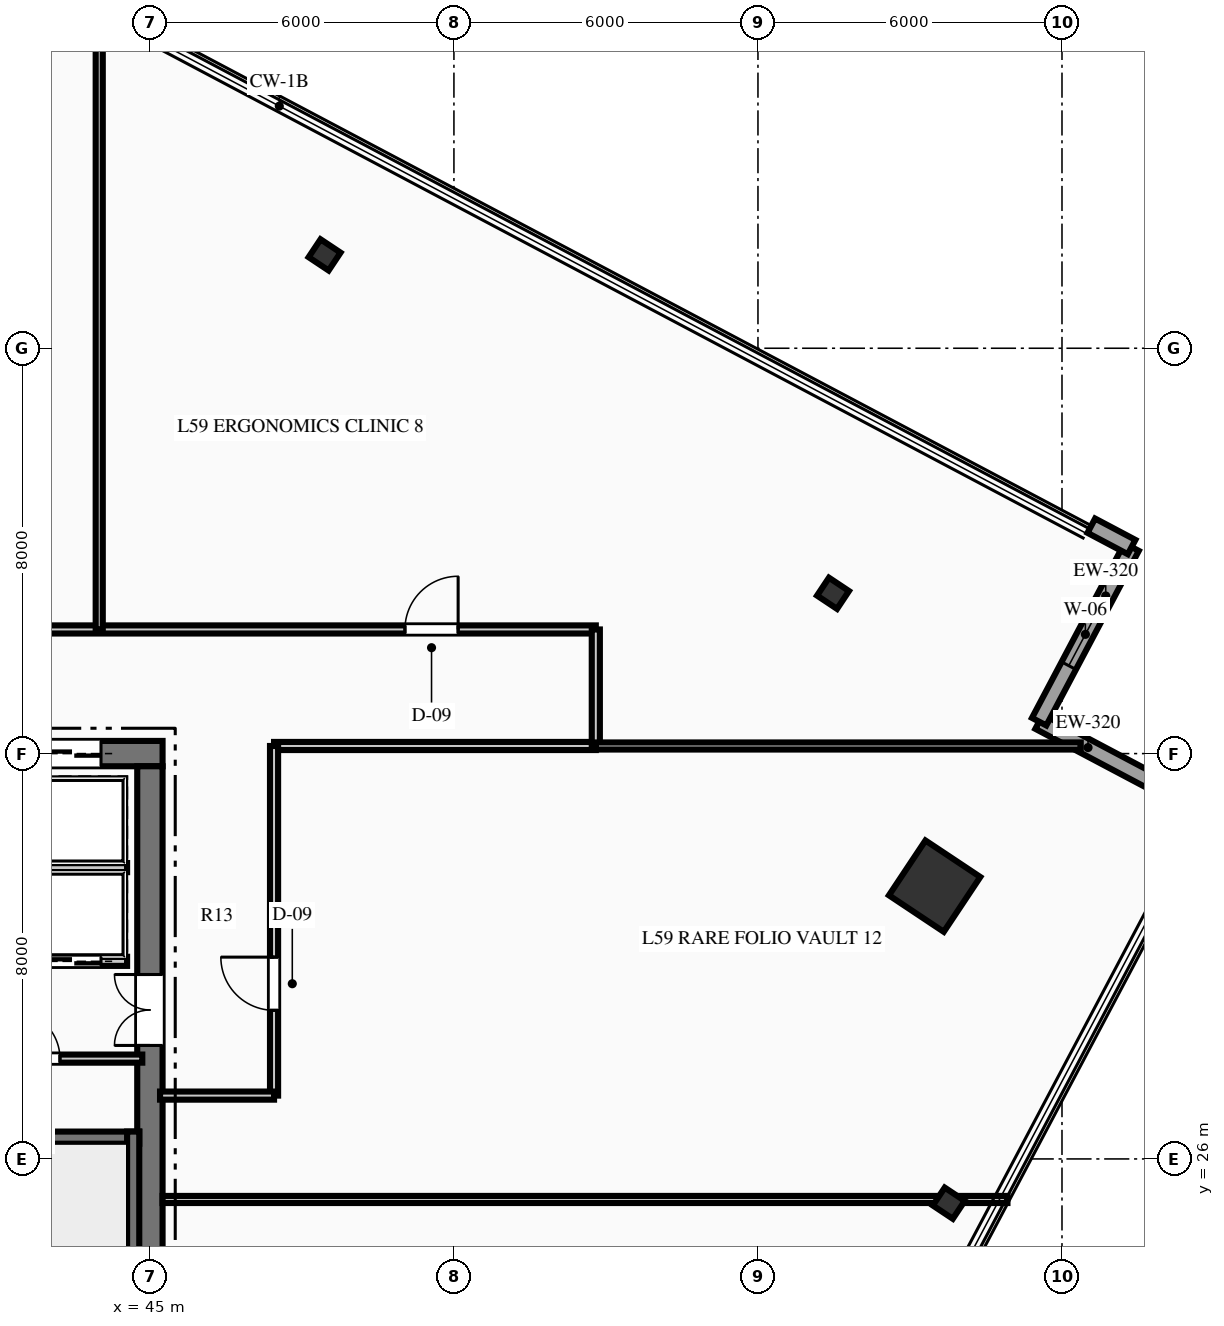
"""IFC4 building model, lengths in metres.
Left out: names, types, materials, properties, quantities, classifications, styles, units other than length and angle.
Written with IfcOpenShell. Run it as: python <this file> out.ifc"""

import sys

from ifc_helpers import new_model, si_unit, direction, frame, frame_2d, origin, origin_2d, place, context, subcontext, project, spatial, rectangle, hollow_rectangle, i_section, extrude, element, fill, save


model = new_model("IFC4")
c1 = context("Model", 3, precision=1e-05, world=origin(), true_north=direction((0.0, 1.0)))
c2 = subcontext(c1, "Body", "Model", "MODEL_VIEW")
j1 = project(units=[si_unit("LENGTHUNIT", "METRE"), si_unit("PLANEANGLEUNIT", "RADIAN")], contexts=[c1])
p1 = place(None, origin())
s1 = spatial("IfcSite", under=j1, at=p1, CompositionType="ELEMENT")
p2 = place(p1, origin())
s2 = spatial("IfcBuilding", under=s1, at=p2, CompositionType="ELEMENT")
p3 = place(p2, frame((0.0, 0.0, 235.95)))
s3 = spatial("IfcBuildingStorey", under=s2, at=p3, CompositionType="ELEMENT", Elevation=235.95)
p4 = place(p3, frame((26.75, 34.0, 0.0), z_axis=(0.0, 0.0, 1.0), x_axis=(1.0, 0.0, 0.0)))
e1 = element("IfcWall", 1, at=p4, inside=s3, PredefinedType="SHEAR", context=c2, shape_type="SweptSolid", body=[
    extrude(rectangle(XDim=18.5, YDim=0.5, at=frame_2d((9.25, 0.0))), origin(), (0.0, 0.0, 1.0), 3.75),
])
p5 = place(p4, frame((13.935, 0.0, 0.0)))
e2 = element("IfcOpeningElement", 2, at=p5, cuts=e1, PredefinedType="OPENING", context=c2, shape_type="SweptSolid", body=[
    extrude(rectangle(XDim=1.1, YDim=2.15, at=frame_2d((0.55, 1.075))), frame((0.0, 0.26, 0.0), z_axis=(0.0, -1.0, 0.0), x_axis=(1.0, 0.0, 0.0)), (0.0, 0.0, 1.0), 0.52),
])
p6 = place(p4, frame((16.185, 0.0, 0.0)))
e3 = element("IfcOpeningElement", 3, at=p6, cuts=e1, PredefinedType="OPENING", context=c2, shape_type="SweptSolid", body=[
    extrude(rectangle(XDim=1.1, YDim=2.15, at=frame_2d((0.55, 1.075))), frame((0.0, 0.26, 0.0), z_axis=(0.0, -1.0, 0.0), x_axis=(1.0, 0.0, 0.0)), (0.0, 0.0, 1.0), 0.52),
])
p7 = place(p3, frame((45.0, 18.25, 0.0), z_axis=(0.0, 0.0, 1.0), x_axis=(0.0, 1.0, 0.0)))
e4 = element("IfcWall", 4, at=p7, inside=s3, PredefinedType="SHEAR", context=c2, shape_type="SweptSolid", body=[
    extrude(rectangle(XDim=15.5, YDim=0.5, at=frame_2d((7.75, 0.0))), origin(), (0.0, 0.0, 1.0), 3.75),
])
p8 = place(p7, frame((9.99, 0.0, 0.0)))
e5 = element("IfcOpeningElement", 5, at=p8, cuts=e4, PredefinedType="OPENING", context=c2, shape_type="SweptSolid", body=[
    extrude(rectangle(XDim=1.4, YDim=2.2, at=frame_2d((0.7, 1.1))), frame((0.0, 0.26, 0.0), z_axis=(0.0, -1.0, 0.0), x_axis=(1.0, 0.0, 0.0)), (0.0, 0.0, 1.0), 0.52),
])
p9 = place(p3, frame((40.81, 26.42, 0.0), z_axis=(0.0, 0.0, 1.0), x_axis=(1.0, 0.0, 0.0)))
e6 = element("IfcWall", 6, at=p9, inside=s3, PredefinedType="SHEAR", context=c2, shape_type="SweptSolid", body=[
    extrude(rectangle(XDim=3.98, YDim=0.24, at=frame_2d((1.99, 0.0))), origin(), (0.0, 0.0, 1.0), 3.75),
])
p10 = place(p3, frame((44.67, 18.28, 0.0), z_axis=(0.0, 0.0, 1.0), x_axis=(0.0, 1.0, 0.0)))
e7 = element("IfcWall", 7, at=p10, inside=s3, PredefinedType="SHEAR", context=c2, shape_type="SweptSolid", body=[
    extrude(rectangle(XDim=8.26, YDim=0.24, at=frame_2d((4.13, 0.0))), origin(), (0.0, 0.0, 1.0), 3.75),
])
p11 = place(p3, frame((60.486, 31.384, 0.0), z_axis=(0.0, 0.0, 1.0), x_axis=(0.554118199338, 0.832437998389, 0.0)))
e8 = element("IfcColumn", 8, at=p11, inside=s3, PredefinedType="COLUMN", context=c2, shape_type="SweptSolid", body=[
    extrude(hollow_rectangle(XDim=1.3, YDim=1.3, WallThickness=0.06, at=origin_2d()), origin(), (0.0, 0.0, 1.0), 3.75),
])
for number, where, z_axis, x_axis in (
    (9, (60.766, 25.126, 0.0), (0.0, 0.0, 1.0), (0.554, 0.832, 0.0)),
    (10, (58.481, 37.164, 0.0), (0.0, 0.0, 1.0), (0.554, 0.832, 0.0)),
    (11, (48.448, 43.842, 0.0), (0.0, 0.0, 1.0), (0.554, 0.832, 0.0)),
):
    element("IfcColumn", number, at=place(p3, frame(where, z_axis=z_axis, x_axis=x_axis)), inside=s3, PredefinedType="COLUMN", context=c2, shape_type="SweptSolid", body=[
        extrude(i_section(OverallWidth=0.424, OverallDepth=0.474, WebThickness=0.048, FlangeThickness=0.077, at=origin_2d()), origin(), (0.0, 0.0, 1.0), 3.75),
    ])
p12 = place(p3, frame((62.549, 34.63, 0.0), z_axis=(0.0, 0.0, 1.0), x_axis=(0.883768120839, -0.467925110021, 0.0)))
e12 = element("IfcWall", 12, at=p12, inside=s3, PredefinedType="STANDARD", context=c2, shape_type="SweptSolid", body=[
    extrude(rectangle(XDim=3.9, YDim=0.32, at=frame_2d((1.95, 0.0))), origin(), (0.0, 0.0, 1.0), 3.4),
])
p13 = place(p3, frame((64.374, 38.077, 0.0), z_axis=(0.0, 0.0, 1.0), x_axis=(-0.467925110021, -0.883768120839, 0.0)))
e13 = element("IfcWall", 13, at=p13, inside=s3, PredefinedType="STANDARD", context=c2, shape_type="SweptSolid", body=[
    extrude(rectangle(XDim=3.9, YDim=0.32, at=frame_2d((1.95, 0.0))), origin(), (0.0, 0.0, 1.0), 3.4),
])
p14 = place(p13, frame((1.25, 0.0, 0.85)))
e14 = element("IfcOpeningElement", 14, at=p14, cuts=e13, PredefinedType="OPENING", context=c2, shape_type="SweptSolid", body=[
    extrude(rectangle(XDim=1.4, YDim=2.0, at=frame_2d((0.7, 1.0))), frame((0.0, 0.17, 0.0), z_axis=(0.0, -1.0, 0.0), x_axis=(1.0, 0.0, 0.0)), (0.0, 0.0, 1.0), 0.34),
])
p15 = place(p3, frame((63.579, 38.498, 0.0), z_axis=(0.0, 0.0, 1.0), x_axis=(0.883768120839, -0.467925110021, 0.0)))
e15 = element("IfcWall", 15, at=p15, inside=s3, PredefinedType="STANDARD", context=c2, shape_type="SweptSolid", body=[
    extrude(rectangle(XDim=0.9, YDim=0.32, at=frame_2d((0.45, 0.0))), origin(), (0.0, 0.0, 1.0), 3.4),
])
p16 = place(p3, frame((40.8, 27.98, 0.0), z_axis=(0.0, 0.0, 1.0), x_axis=(1.0, 0.0, 0.0)))
e16 = element("IfcWall", 16, at=p16, inside=s3, PredefinedType="PARTITIONING", context=c2, shape_type="SweptSolid", body=[
    extrude(rectangle(XDim=4.05, YDim=0.16, at=frame_2d((2.025, 0.0))), origin(), (0.0, 0.0, 1.0), 3.4),
])
p17 = place(p16, frame((1.475, 0.0, 0.0)))
e17 = element("IfcOpeningElement", 17, at=p17, cuts=e16, PredefinedType="OPENING", context=c2, shape_type="SweptSolid", body=[
    extrude(rectangle(XDim=0.95, YDim=2.15, at=frame_2d((0.475, 1.075))), frame((0.0, 0.09, 0.0), z_axis=(0.0, -1.0, 0.0), x_axis=(1.0, 0.0, 0.0)), (0.0, 0.0, 1.0), 0.18),
])
p18 = place(p3, frame((40.12, 29.9, 0.0), z_axis=(0.0, 0.0, 1.0), x_axis=(1.0, 0.0, 0.0)))
e18 = element("IfcWall", 18, at=p18, inside=s3, PredefinedType="PARTITIONING", context=c2, shape_type="SweptSolid", body=[
    extrude(rectangle(XDim=4.43, YDim=0.18, at=frame_2d((2.215, 0.0))), origin(), (0.0, 0.0, 1.0), 3.4),
])
p19 = place(p18, frame((0.565, 0.0, 0.0)))
e19 = element("IfcOpeningElement", 19, at=p19, cuts=e18, PredefinedType="OPENING", context=c2, shape_type="SweptSolid", body=[
    extrude(rectangle(XDim=1.1, YDim=2.15, at=frame_2d((0.55, 1.075))), frame((0.0, 0.1, 0.0), z_axis=(0.0, -1.0, 0.0), x_axis=(1.0, 0.0, 0.0)), (0.0, 0.0, 1.0), 0.2),
])
p20 = place(p18, frame((2.815, 0.0, 0.0)))
e20 = element("IfcOpeningElement", 20, at=p20, cuts=e18, PredefinedType="OPENING", context=c2, shape_type="SweptSolid", body=[
    extrude(rectangle(XDim=1.1, YDim=2.15, at=frame_2d((0.55, 1.075))), frame((0.0, 0.1, 0.0), z_axis=(0.0, -1.0, 0.0), x_axis=(1.0, 0.0, 0.0)), (0.0, 0.0, 1.0), 0.2),
])
p21 = place(p3, frame((40.12, 31.75, 0.0), z_axis=(0.0, 0.0, 1.0), x_axis=(1.0, 0.0, 0.0)))
e21 = element("IfcWall", 21, at=p21, inside=s3, PredefinedType="PARTITIONING", context=c2, shape_type="SweptSolid", body=[
    extrude(rectangle(XDim=4.43, YDim=0.18, at=frame_2d((2.215, 0.0))), origin(), (0.0, 0.0, 1.0), 3.4),
])
p22 = place(p3, frame((18.2, 36.45, 0.0), z_axis=(0.0, 0.0, 1.0), x_axis=(1.0, 0.0, 0.0)))
e22 = element("IfcWall", 22, at=p22, inside=s3, PredefinedType="PARTITIONING", context=c2, shape_type="SweptSolid", body=[
    extrude(rectangle(XDim=35.6, YDim=0.16, at=frame_2d((17.8, 0.0))), origin(), (0.0, 0.0, 1.0), 2.779),
])
p23 = place(p22, frame((7.55, 0.0, 0.0)))
e23 = element("IfcOpeningElement", 23, at=p23, cuts=e22, PredefinedType="OPENING", context=c2, shape_type="SweptSolid", body=[
    extrude(rectangle(XDim=0.9, YDim=2.15, at=frame_2d((0.45, 1.075))), frame((0.0, 0.09, 0.0), z_axis=(0.0, -1.0, 0.0), x_axis=(1.0, 0.0, 0.0)), (0.0, 0.0, 1.0), 0.18),
])
p24 = place(p22, frame((9.85, 0.0, 0.0)))
e24 = element("IfcOpeningElement", 24, at=p24, cuts=e22, PredefinedType="OPENING", context=c2, shape_type="SweptSolid", body=[
    extrude(rectangle(XDim=0.9, YDim=2.15, at=frame_2d((0.45, 1.075))), frame((0.0, 0.09, 0.0), z_axis=(0.0, -1.0, 0.0), x_axis=(1.0, 0.0, 0.0)), (0.0, 0.0, 1.0), 0.18),
])
p25 = place(p22, frame((12.1, 0.0, 0.0)))
e25 = element("IfcOpeningElement", 25, at=p25, cuts=e22, PredefinedType="OPENING", context=c2, shape_type="SweptSolid", body=[
    extrude(rectangle(XDim=1.0, YDim=2.15, at=frame_2d((0.5, 1.075))), frame((0.0, 0.09, 0.0), z_axis=(0.0, -1.0, 0.0), x_axis=(1.0, 0.0, 0.0)), (0.0, 0.0, 1.0), 0.18),
])
p26 = place(p22, frame((4.345, 0.0, 0.0)))
e26 = element("IfcOpeningElement", 26, at=p26, cuts=e22, PredefinedType="OPENING", context=c2, shape_type="SweptSolid", body=[
    extrude(rectangle(XDim=1.05, YDim=2.15, at=frame_2d((0.525, 1.075))), frame((0.0, 0.09, 0.0), z_axis=(0.0, -1.0, 0.0), x_axis=(1.0, 0.0, 0.0)), (0.0, 0.0, 1.0), 0.18),
])
p27 = place(p22, frame((19.035, 0.0, 0.0)))
e27 = element("IfcOpeningElement", 27, at=p27, cuts=e22, PredefinedType="OPENING", context=c2, shape_type="SweptSolid", body=[
    extrude(rectangle(XDim=1.05, YDim=2.15, at=frame_2d((0.525, 1.075))), frame((0.0, 0.09, 0.0), z_axis=(0.0, -1.0, 0.0), x_axis=(1.0, 0.0, 0.0)), (0.0, 0.0, 1.0), 0.18),
])
p28 = place(p22, frame((31.833, 0.0, 0.0)))
e28 = element("IfcOpeningElement", 28, at=p28, cuts=e22, PredefinedType="OPENING", context=c2, shape_type="SweptSolid", body=[
    extrude(rectangle(XDim=1.05, YDim=2.15, at=frame_2d((0.525, 1.075))), frame((0.0, 0.09, 0.0), z_axis=(0.0, -1.0, 0.0), x_axis=(1.0, 0.0, 0.0)), (0.0, 0.0, 1.0), 0.18),
])
p29 = place(p3, frame((47.45, 34.15, 0.0), z_axis=(0.0, 0.0, 1.0), x_axis=(1.0, 0.0, 0.0)))
e29 = element("IfcWall", 29, at=p29, inside=s3, PredefinedType="PARTITIONING", context=c2, shape_type="SweptSolid", body=[
    extrude(rectangle(XDim=6.35, YDim=0.16, at=frame_2d((3.175, 0.0))), origin(), (0.0, 0.0, 1.0), 3.4),
])
p30 = place(p3, frame((47.45, 27.25, 0.0), z_axis=(0.0, 0.0, 1.0), x_axis=(0.0, 1.0, 0.0)))
e30 = element("IfcWall", 30, at=p30, inside=s3, PredefinedType="PARTITIONING", context=c2, shape_type="SweptSolid", body=[
    extrude(rectangle(XDim=6.9, YDim=0.16, at=frame_2d((3.45, 0.0))), origin(), (0.0, 0.0, 1.0), 3.4),
])
p31 = place(p30, frame((1.683, 0.0, 0.0)))
e31 = element("IfcOpeningElement", 31, at=p31, cuts=e30, PredefinedType="OPENING", context=c2, shape_type="SweptSolid", body=[
    extrude(rectangle(XDim=1.05, YDim=2.15, at=frame_2d((0.525, 1.075))), frame((0.0, 0.09, 0.0), z_axis=(0.0, -1.0, 0.0), x_axis=(1.0, 0.0, 0.0)), (0.0, 0.0, 1.0), 0.18),
])
p32 = place(p3, frame((45.2, 27.25, 0.0), z_axis=(0.0, 0.0, 1.0), x_axis=(1.0, 0.0, 0.0)))
e32 = element("IfcWall", 32, at=p32, inside=s3, PredefinedType="PARTITIONING", context=c2, shape_type="SweptSolid", body=[
    extrude(rectangle(XDim=2.25, YDim=0.16, at=frame_2d((1.125, 0.0))), origin(), (0.0, 0.0, 1.0), 3.4),
])
p33 = place(p3, frame((53.8, 34.15, 0.0), z_axis=(0.0, 0.0, 1.0), x_axis=(0.0, 1.0, 0.0)))
e33 = element("IfcWall", 33, at=p33, inside=s3, PredefinedType="PARTITIONING", context=c2, shape_type="SweptSolid", body=[
    extrude(rectangle(XDim=2.3, YDim=0.16, at=frame_2d((1.15, 0.0))), origin(), (0.0, 0.0, 1.0), 3.4),
])
p34 = place(p3, frame((53.8, 34.15, 0.0), z_axis=(0.0, 0.0, 1.0), x_axis=(1.0, 0.0, 0.0)))
e34 = element("IfcWall", 34, at=p34, inside=s3, PredefinedType="PARTITIONING", context=c2, shape_type="SweptSolid", body=[
    extrude(rectangle(XDim=9.57, YDim=0.14, at=frame_2d((4.785, 0.0))), origin(), (0.0, 0.0, 1.0), 3.4),
])
p35 = place(p3, frame((44.0, 36.45, 0.0), z_axis=(0.0, 0.0, 1.0), x_axis=(0.0, 1.0, 0.0)))
e35 = element("IfcWall", 35, at=p35, inside=s3, PredefinedType="PARTITIONING", context=c2, shape_type="SweptSolid", body=[
    extrude(rectangle(XDim=12.369, YDim=0.14, at=frame_2d((6.185, 0.0))), origin(), (0.0, 0.0, 1.0), 3.4),
])
p36 = place(p3, frame((45.25, 25.2, 0.0), z_axis=(0.0, 0.0, 1.0), x_axis=(1.0, 0.0, 0.0)))
e36 = element("IfcWall", 36, at=p36, inside=s3, PredefinedType="PARTITIONING", context=c2, shape_type="SweptSolid", body=[
    extrude(rectangle(XDim=16.674, YDim=0.14, at=frame_2d((8.337, 0.0))), origin(), (0.0, 0.0, 1.0), 2.779),
])
p37 = place(p14, origin())
e37 = element("IfcWindow", 37, at=p37, inside=s3, PartitioningType="SINGLE_PANEL", PredefinedType="WINDOW", context=c2, shape_type="SweptSolid", body=[
    extrude(rectangle(XDim=1.4, YDim=2.0, at=frame_2d((0.7, 1.0))), frame((0.0, 0.03, 0.0), z_axis=(0.0, -1.0, 0.0), x_axis=(1.0, 0.0, 0.0)), (0.0, 0.0, 1.0), 0.06),
])
fill(e14, e37)
p38 = place(p17, origin())
e38 = element("IfcDoor", 38, at=p38, inside=s3, OperationType="SINGLE_SWING_LEFT", PredefinedType="DOOR", context=c2, shape_type="SweptSolid", body=[
    extrude(rectangle(XDim=0.95, YDim=2.15, at=frame_2d((0.475, 1.075))), frame((0.0, 0.025, 0.0), z_axis=(0.0, -1.0, 0.0), x_axis=(1.0, 0.0, 0.0)), (0.0, 0.0, 1.0), 0.05),
])
fill(e17, e38)
p39 = place(p8, origin())
e39 = element("IfcDoor", 39, at=p39, inside=s3, OperationType="DOUBLE_DOOR_SINGLE_SWING", PredefinedType="DOOR", context=c2, shape_type="SweptSolid", body=[
    extrude(rectangle(XDim=1.4, YDim=2.2, at=frame_2d((0.7, 1.1))), frame((0.0, 0.025, 0.0), z_axis=(0.0, -1.0, 0.0), x_axis=(1.0, 0.0, 0.0)), (0.0, 0.0, 1.0), 0.05),
])
fill(e5, e39)
p40 = place(p28, origin())
e40 = element("IfcDoor", 40, at=p40, inside=s3, OperationType="SINGLE_SWING_RIGHT", PredefinedType="DOOR", context=c2, shape_type="SweptSolid", body=[
    extrude(rectangle(XDim=1.05, YDim=2.15, at=frame_2d((0.525, 1.075))), frame((0.0, 0.025, 0.0), z_axis=(0.0, -1.0, 0.0), x_axis=(1.0, 0.0, 0.0)), (0.0, 0.0, 1.0), 0.05),
])
fill(e28, e40)
p41 = place(p31, origin())
e41 = element("IfcDoor", 41, at=p41, inside=s3, OperationType="SINGLE_SWING_RIGHT", PredefinedType="DOOR", context=c2, shape_type="SweptSolid", body=[
    extrude(rectangle(XDim=1.05, YDim=2.15, at=frame_2d((0.525, 1.075))), frame((0.0, 0.025, 0.0), z_axis=(0.0, -1.0, 0.0), x_axis=(1.0, 0.0, 0.0)), (0.0, 0.0, 1.0), 0.05),
])
fill(e31, e41)
p42 = place(p20, origin())
e42 = element("IfcDoor", 42, at=p42, inside=s3, OperationType="SLIDING_TO_LEFT", PredefinedType="DOOR", context=c2, shape_type="SweptSolid", body=[
    extrude(rectangle(XDim=1.1, YDim=2.15, at=frame_2d((0.55, 1.075))), frame((0.0, 0.025, 0.0), z_axis=(0.0, -1.0, 0.0), x_axis=(1.0, 0.0, 0.0)), (0.0, 0.0, 1.0), 0.05),
])
fill(e20, e42)
p43 = place(p6, origin())
e43 = element("IfcDoor", 43, at=p43, inside=s3, OperationType="SLIDING_TO_LEFT", PredefinedType="DOOR", context=c2, shape_type="SweptSolid", body=[
    extrude(rectangle(XDim=1.1, YDim=2.15, at=frame_2d((0.55, 1.075))), frame((0.0, 0.025, 0.0), z_axis=(0.0, -1.0, 0.0), x_axis=(1.0, 0.0, 0.0)), (0.0, 0.0, 1.0), 0.05),
])
fill(e3, e43)
save(model, sys.argv[1])
